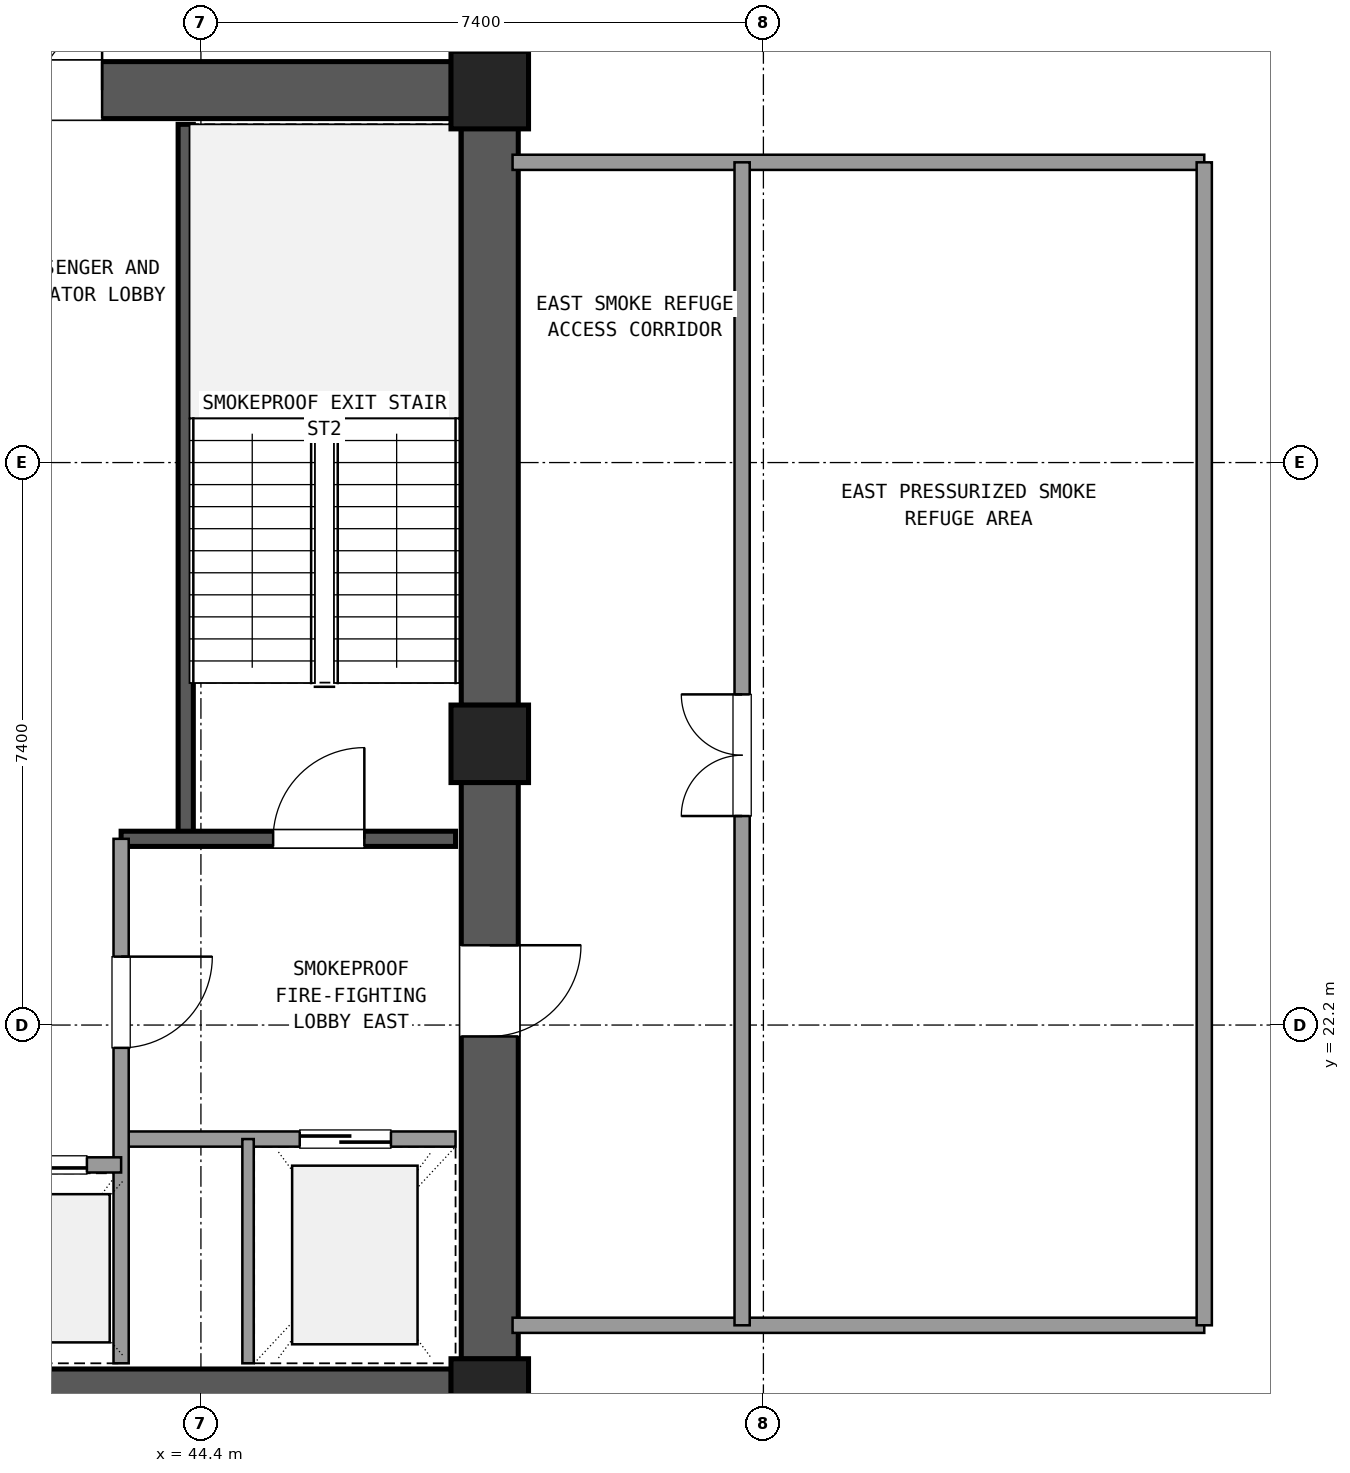
"""IFC4 building model, lengths in metres.
Left out: names, types, materials, properties, quantities, classifications, styles, units other than length and angle.
Written with IfcOpenShell. Run it as: python <this file> out.ifc"""

import sys

from ifc_helpers import new_model, si_unit, direction, frame, frame_2d, origin, origin_2d, place, context, subcontext, project, spatial, rectangle, extrude, element, fill, save


model = new_model("IFC4")
c1 = context("Model", 3, precision=1e-05, world=origin(), true_north=direction((0.0, 1.0)))
c2 = subcontext(c1, "Body", "Model", "MODEL_VIEW")
j1 = project(units=[si_unit("LENGTHUNIT", "METRE"), si_unit("PLANEANGLEUNIT", "RADIAN")], contexts=[c1])
p1 = place(None, origin())
s1 = spatial("IfcSite", under=j1, at=p1, CompositionType="ELEMENT")
p2 = place(p1, origin())
s2 = spatial("IfcBuilding", under=s1, at=p2, CompositionType="ELEMENT")
p3 = place(p2, frame((0.0, 0.0, 178.02)))
s3 = spatial("IfcBuildingStorey", under=s2, at=p3, CompositionType="ELEMENT", Elevation=178.02)
for number, where, z_axis, x_axis in (
    (1, (48.2, 17.3, 0.0), (0.0, 0.0, 1.0), (1.0, 0.0, 0.0)),
    (2, (48.2, 25.9, 0.0), (0.0, 0.0, 1.0), (1.0, 0.0, 0.0)),
    (3, (48.2, 34.5, 0.0), (0.0, 0.0, 1.0), (1.0, 0.0, 0.0)),
):
    element("IfcColumn", number, at=place(p3, frame(where, z_axis=z_axis, x_axis=x_axis)), inside=s3, PredefinedType="COLUMN", context=c2, shape_type="SweptSolid", body=[
        extrude(rectangle(XDim=1.02, YDim=1.02, at=origin_2d()), origin(), (0.0, 0.0, 1.0), 4.68),
    ])
p4 = place(p3, frame((37.505, 17.3, 0.0), z_axis=(0.0, 0.0, 1.0), x_axis=(1.0, 0.0, 0.0)))
e4 = element("IfcWall", 4, at=p4, inside=s3, PredefinedType="SHEAR", context=c2, shape_type="SweptSolid", body=[
    extrude(rectangle(XDim=10.19, YDim=0.75, at=frame_2d((5.095, 0.0))), origin(), (0.0, 0.0, 1.0), 4.38),
])
p5 = place(p3, frame((48.2, 17.805, 0.0), z_axis=(0.0, 0.0, 1.0), x_axis=(0.0, 1.0, 0.0)))
e5 = element("IfcWall", 5, at=p5, inside=s3, PredefinedType="SHEAR", context=c2, shape_type="SweptSolid", body=[
    extrude(rectangle(XDim=7.59, YDim=0.75, at=frame_2d((3.795, 0.0))), origin(), (0.0, 0.0, 1.0), 4.38),
])
p6 = place(p5, frame((4.245, 0.0, 0.0)))
e6 = element("IfcOpeningElement", 6, at=p6, cuts=e5, PredefinedType="OPENING", context=c2, shape_type="SweptSolid", body=[
    extrude(rectangle(XDim=1.2, YDim=2.15, at=frame_2d((0.6, 1.075))), frame((0.0, 0.385, 0.0), z_axis=(0.0, -1.0, 0.0), x_axis=(1.0, 0.0, 0.0)), (0.0, 0.0, 1.0), 0.77),
])
p7 = place(p3, frame((48.2, 26.405, 0.0), z_axis=(0.0, 0.0, 1.0), x_axis=(0.0, 1.0, 0.0)))
e7 = element("IfcWall", 7, at=p7, inside=s3, PredefinedType="SHEAR", context=c2, shape_type="SweptSolid", body=[
    extrude(rectangle(XDim=7.59, YDim=0.75, at=frame_2d((3.795, 0.0))), origin(), (0.0, 0.0, 1.0), 4.38),
])
p8 = place(p3, frame((47.695, 34.5, 0.0), z_axis=(0.0, 0.0, 1.0), x_axis=(-1.0, 0.0, 0.0)))
e8 = element("IfcWall", 8, at=p8, inside=s3, PredefinedType="SHEAR", context=c2, shape_type="SweptSolid", body=[
    extrude(rectangle(XDim=10.19, YDim=0.75, at=frame_2d((5.095, 0.0))), origin(), (0.0, 0.0, 1.0), 4.38),
])
p9 = place(p8, frame((4.595, 0.0, 0.0)))
e9 = element("IfcOpeningElement", 9, at=p9, cuts=e8, PredefinedType="OPENING", context=c2, shape_type="SweptSolid", body=[
    extrude(rectangle(XDim=1.6, YDim=2.2, at=frame_2d((0.8, 1.1))), frame((0.0, 0.385, 0.0), z_axis=(0.0, -1.0, 0.0), x_axis=(1.0, 0.0, 0.0)), (0.0, 0.0, 1.0), 0.77),
])
p10 = place(p3, frame((44.2, 24.65, 0.0), z_axis=(0.0, 0.0, 1.0), x_axis=(0.0, 1.0, 0.0)))
e10 = element("IfcWall", 10, at=p10, inside=s3, PredefinedType="SHEAR", context=c2, shape_type="SweptSolid", body=[
    extrude(rectangle(XDim=9.4, YDim=0.2, at=frame_2d((4.7, 0.0))), origin(), (0.0, 0.0, 1.0), 4.38),
])
p11 = place(p3, frame((43.35, 24.65, 0.0), z_axis=(0.0, 0.0, 1.0), x_axis=(1.0, 0.0, 0.0)))
e11 = element("IfcWall", 11, at=p11, inside=s3, PredefinedType="SHEAR", context=c2, shape_type="SweptSolid", body=[
    extrude(rectangle(XDim=4.4, YDim=0.2, at=frame_2d((2.2, 0.0))), origin(), (0.0, 0.0, 1.0), 4.38),
])
p12 = place(p11, frame((2.0, 0.0, 0.0)))
e12 = element("IfcOpeningElement", 12, at=p12, cuts=e11, PredefinedType="OPENING", context=c2, shape_type="SweptSolid", body=[
    extrude(rectangle(XDim=1.2, YDim=2.15, at=frame_2d((0.6, 1.075))), frame((0.0, 0.11, 0.0), z_axis=(0.0, -1.0, 0.0), x_axis=(1.0, 0.0, 0.0)), (0.0, 0.0, 1.0), 0.22),
])
p13 = place(p3, frame((43.35, 20.7, 0.0), z_axis=(0.0, 0.0, 1.0), x_axis=(1.0, 0.0, 0.0)))
e13 = element("IfcWall", 13, at=p13, inside=s3, PredefinedType="SOLIDWALL", context=c2, shape_type="SweptSolid", body=[
    extrude(rectangle(XDim=4.4, YDim=0.2, at=frame_2d((2.2, 0.0))), origin(), (0.0, 0.0, 1.0), 3.49),
])
p14 = place(p13, frame((2.35, 0.0, 0.0)))
e14 = element("IfcOpeningElement", 14, at=p14, cuts=e13, PredefinedType="OPENING", context=c2, shape_type="SweptSolid", body=[
    extrude(rectangle(XDim=1.2, YDim=2.15, at=frame_2d((0.6, 1.075))), frame((0.0, 0.11, 0.0), z_axis=(0.0, -1.0, 0.0), x_axis=(1.0, 0.0, 0.0)), (0.0, 0.0, 1.0), 0.22),
])
p15 = place(p3, frame((43.35, 17.75, 0.0), z_axis=(0.0, 0.0, 1.0), x_axis=(0.0, 1.0, 0.0)))
e15 = element("IfcWall", 15, at=p15, inside=s3, PredefinedType="SOLIDWALL", context=c2, shape_type="SweptSolid", body=[
    extrude(rectangle(XDim=6.9, YDim=0.2, at=frame_2d((3.45, 0.0))), origin(), (0.0, 0.0, 1.0), 3.49),
])
p16 = place(p15, frame((4.15, 0.0, 0.0)))
e16 = element("IfcOpeningElement", 16, at=p16, cuts=e15, PredefinedType="OPENING", context=c2, shape_type="SweptSolid", body=[
    extrude(rectangle(XDim=1.2, YDim=2.15, at=frame_2d((0.6, 1.075))), frame((0.0, 0.11, 0.0), z_axis=(0.0, -1.0, 0.0), x_axis=(1.0, 0.0, 0.0)), (0.0, 0.0, 1.0), 0.22),
])
p17 = place(p3, frame((45.02, 17.75, 0.0), z_axis=(0.0, 0.0, 1.0), x_axis=(0.0, 1.0, 0.0)))
e17 = element("IfcWall", 17, at=p17, inside=s3, PredefinedType="PARTITIONING", context=c2, shape_type="SweptSolid", body=[
    extrude(rectangle(XDim=2.95, YDim=0.15, at=frame_2d((1.475, 0.0))), origin(), (0.0, 0.0, 1.0), 3.49),
])
p18 = place(p3, frame((37.25, 20.36, 0.0), z_axis=(0.0, 0.0, 1.0), x_axis=(1.0, 0.0, 0.0)))
e18 = element("IfcWall", 18, at=p18, inside=s3, PredefinedType="SOLIDWALL", context=c2, shape_type="SweptSolid", body=[
    extrude(rectangle(XDim=6.1, YDim=0.2, at=frame_2d((3.05, 0.0))), origin(), (0.0, 0.0, 1.0), 3.49),
])
p19 = place(p18, frame((0.45, 0.0, 0.0)))
e19 = element("IfcOpeningElement", 19, at=p19, cuts=e18, PredefinedType="OPENING", context=c2, shape_type="SweptSolid", body=[
    extrude(rectangle(XDim=1.1, YDim=2.15, at=frame_2d((0.55, 1.075))), frame((0.0, 0.11, 0.0), z_axis=(0.0, -1.0, 0.0), x_axis=(1.0, 0.0, 0.0)), (0.0, 0.0, 1.0), 0.22),
])
p20 = place(p18, frame((2.5, 0.0, 0.0)))
e20 = element("IfcOpeningElement", 20, at=p20, cuts=e18, PredefinedType="OPENING", context=c2, shape_type="SweptSolid", body=[
    extrude(rectangle(XDim=1.1, YDim=2.15, at=frame_2d((0.55, 1.075))), frame((0.0, 0.11, 0.0), z_axis=(0.0, -1.0, 0.0), x_axis=(1.0, 0.0, 0.0)), (0.0, 0.0, 1.0), 0.22),
])
p21 = place(p18, frame((4.55, 0.0, 0.0)))
e21 = element("IfcOpeningElement", 21, at=p21, cuts=e18, PredefinedType="OPENING", context=c2, shape_type="SweptSolid", body=[
    extrude(rectangle(XDim=1.1, YDim=2.15, at=frame_2d((0.55, 1.075))), frame((0.0, 0.11, 0.0), z_axis=(0.0, -1.0, 0.0), x_axis=(1.0, 0.0, 0.0)), (0.0, 0.0, 1.0), 0.22),
])
p22 = place(p3, frame((48.0, 34.8, 0.0), z_axis=(0.0, 0.0, 1.0), x_axis=(0.0, 1.0, 0.0)))
e22 = element("IfcWall", 22, at=p22, inside=s3, PredefinedType="SOLIDWALL", context=c2, shape_type="SweptSolid", body=[
    extrude(rectangle(XDim=10.4, YDim=0.2, at=frame_2d((5.2, 0.0))), origin(), (0.0, 0.0, 1.0), 3.49),
])
for number, where, z_axis, x_axis in (
    (23, (48.5, 18.25, 0.0), (0.0, 0.0, 1.0), (1.0, 0.0, 0.0)),
    (24, (48.5, 33.55, 0.0), (0.0, 0.0, 1.0), (1.0, 0.0, 0.0)),
):
    element("IfcWall", number, at=place(p3, frame(where, z_axis=z_axis, x_axis=x_axis)), inside=s3, PredefinedType="SOLIDWALL", context=c2, shape_type="SweptSolid", body=[
        extrude(rectangle(XDim=9.1, YDim=0.2, at=frame_2d((4.55, 0.0))), origin(), (0.0, 0.0, 1.0), 3.49),
    ])
p23 = place(p3, frame((57.6, 18.25, 0.0), z_axis=(0.0, 0.0, 1.0), x_axis=(0.0, 1.0, 0.0)))
e25 = element("IfcWall", 25, at=p23, inside=s3, PredefinedType="SOLIDWALL", context=c2, shape_type="SweptSolid", body=[
    extrude(rectangle(XDim=15.3, YDim=0.2, at=frame_2d((7.65, 0.0))), origin(), (0.0, 0.0, 1.0), 3.49),
])
p24 = place(p3, frame((51.52, 18.25, 0.0), z_axis=(0.0, 0.0, 1.0), x_axis=(0.0, 1.0, 0.0)))
e26 = element("IfcWall", 26, at=p24, inside=s3, PredefinedType="SOLIDWALL", context=c2, shape_type="SweptSolid", body=[
    extrude(rectangle(XDim=15.3, YDim=0.2, at=frame_2d((7.65, 0.0))), origin(), (0.0, 0.0, 1.0), 3.49),
])
p25 = place(p24, frame((6.7, 0.0, 0.0)))
e27 = element("IfcOpeningElement", 27, at=p25, cuts=e26, PredefinedType="OPENING", context=c2, shape_type="SweptSolid", body=[
    extrude(rectangle(XDim=1.6, YDim=2.2, at=frame_2d((0.8, 1.1))), frame((0.0, 0.11, 0.0), z_axis=(0.0, -1.0, 0.0), x_axis=(1.0, 0.0, 0.0)), (0.0, 0.0, 1.0), 0.22),
])
p26 = place(p12, origin())
e28 = element("IfcDoor", 28, at=p26, inside=s3, OperationType="SINGLE_SWING_RIGHT", PredefinedType="DOOR", context=c2, shape_type="SweptSolid", body=[
    extrude(rectangle(XDim=1.2, YDim=2.15, at=frame_2d((0.6, 1.075))), frame((0.0, 0.025, 0.0), z_axis=(0.0, -1.0, 0.0), x_axis=(1.0, 0.0, 0.0)), (0.0, 0.0, 1.0), 0.05),
])
fill(e12, e28)
p27 = place(p14, origin())
e29 = element("IfcDoor", 29, at=p27, inside=s3, OperationType="SLIDING_TO_RIGHT", PredefinedType="DOOR", context=c2, shape_type="SweptSolid", body=[
    extrude(rectangle(XDim=1.2, YDim=2.15, at=frame_2d((0.6, 1.075))), frame((0.0, 0.025, 0.0), z_axis=(0.0, -1.0, 0.0), x_axis=(1.0, 0.0, 0.0)), (0.0, 0.0, 1.0), 0.05),
])
fill(e14, e29)
p28 = place(p16, frame((1.2, 0.0, 0.0), z_axis=(0.0, 0.0, 1.0), x_axis=(-1.0, 0.0, 0.0)))
e30 = element("IfcDoor", 30, at=p28, inside=s3, OperationType="SINGLE_SWING_RIGHT", PredefinedType="DOOR", context=c2, shape_type="SweptSolid", body=[
    extrude(rectangle(XDim=1.2, YDim=2.15, at=frame_2d((0.6, 1.075))), frame((0.0, 0.025, 0.0), z_axis=(0.0, -1.0, 0.0), x_axis=(1.0, 0.0, 0.0)), (0.0, 0.0, 1.0), 0.05),
])
fill(e16, e30)
p29 = place(p6, frame((1.2, 0.0, 0.0), z_axis=(0.0, 0.0, 1.0), x_axis=(-1.0, 0.0, 0.0)))
e31 = element("IfcDoor", 31, at=p29, inside=s3, OperationType="SINGLE_SWING_RIGHT", PredefinedType="DOOR", context=c2, shape_type="SweptSolid", body=[
    extrude(rectangle(XDim=1.2, YDim=2.15, at=frame_2d((0.6, 1.075))), frame((0.0, 0.025, 0.0), z_axis=(0.0, -1.0, 0.0), x_axis=(1.0, 0.0, 0.0)), (0.0, 0.0, 1.0), 0.05),
])
fill(e6, e31)
p30 = place(p9, frame((1.6, 0.0, 0.0), z_axis=(0.0, 0.0, 1.0), x_axis=(-1.0, 0.0, 0.0)))
e32 = element("IfcDoor", 32, at=p30, inside=s3, OperationType="DOUBLE_DOOR_SINGLE_SWING", PredefinedType="DOOR", context=c2, shape_type="SweptSolid", body=[
    extrude(rectangle(XDim=1.6, YDim=2.2, at=frame_2d((0.8, 1.1))), frame((0.0, 0.025, 0.0), z_axis=(0.0, -1.0, 0.0), x_axis=(1.0, 0.0, 0.0)), (0.0, 0.0, 1.0), 0.05),
])
fill(e9, e32)
p31 = place(p21, origin())
e33 = element("IfcDoor", 33, at=p31, inside=s3, OperationType="SLIDING_TO_LEFT", PredefinedType="DOOR", context=c2, shape_type="SweptSolid", body=[
    extrude(rectangle(XDim=1.1, YDim=2.15, at=frame_2d((0.55, 1.075))), frame((0.0, 0.025, 0.0), z_axis=(0.0, -1.0, 0.0), x_axis=(1.0, 0.0, 0.0)), (0.0, 0.0, 1.0), 0.05),
])
fill(e21, e33)
p32 = place(p25, origin())
e34 = element("IfcDoor", 34, at=p32, inside=s3, OperationType="DOUBLE_DOOR_SINGLE_SWING", PredefinedType="DOOR", context=c2, shape_type="SweptSolid", body=[
    extrude(rectangle(XDim=1.6, YDim=2.2, at=frame_2d((0.8, 1.1))), frame((0.0, 0.025, 0.0), z_axis=(0.0, -1.0, 0.0), x_axis=(1.0, 0.0, 0.0)), (0.0, 0.0, 1.0), 0.05),
])
fill(e27, e34)
save(model, sys.argv[1])
